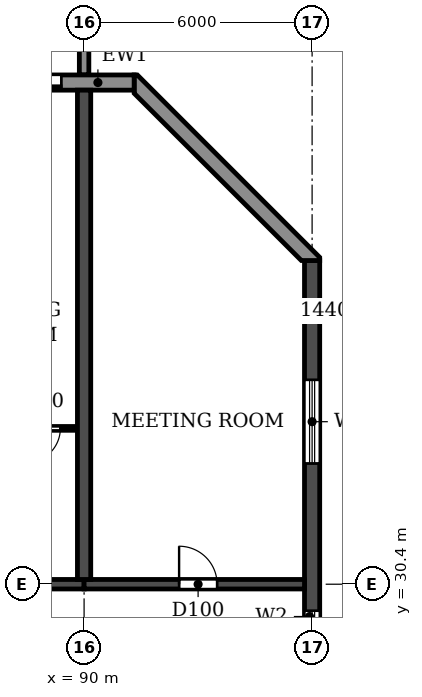
"""IFC4 building model, lengths in metres.
Left out: names, types, materials, properties, quantities, classifications, styles, units other than length and angle.
Written with IfcOpenShell. Run it as: python <this file> out.ifc"""

import sys

from ifc_helpers import new_model, si_unit, direction, frame, frame_2d, origin, place, context, subcontext, project, spatial, polyline, rectangle, outline, extrude, source, transform, mapped, element, fill, save


model = new_model("IFC4")
c1 = context("Model", 3, precision=1e-05, world=origin(), true_north=direction((0.0, 1.0)))
c2 = subcontext(c1, "Body", "Model", "MODEL_VIEW")
j1 = project(units=[si_unit("LENGTHUNIT", "METRE"), si_unit("PLANEANGLEUNIT", "RADIAN")], contexts=[c1])
p1 = place(None, origin())
s1 = spatial("IfcSite", under=j1, at=p1, CompositionType="ELEMENT")
p2 = place(p1, origin())
s2 = spatial("IfcBuilding", under=s1, at=p2, CompositionType="ELEMENT")
p3 = place(p2, frame((0.0, 0.0, 92.7)))
s3 = spatial("IfcBuildingStorey", under=s2, at=p3, CompositionType="ELEMENT", Elevation=92.7)
p4 = place(p3, frame((90.0, 30.525, 0.0), z_axis=(0.0, 0.0, 1.0), x_axis=(0.0, 1.0, 0.0)))
e1 = element("IfcWall", 1, at=p4, inside=s3, PredefinedType="SHEAR", context=c2, shape_type="SweptSolid", body=[
    extrude(rectangle(XDim=12.875, YDim=0.35, at=frame_2d((6.438, 0.0))), origin(), (0.0, 0.0, 1.0), 3.06),
])
p5 = place(p3, frame((96.0, 4.683, 0.0), z_axis=(0.0, 0.0, 1.0), x_axis=(0.0, 1.0, 0.0)))
e2 = element("IfcWall", 2, at=p5, inside=s3, PredefinedType="SHEAR", context=c2, shape_type="SweptSolid", body=[
    extrude(rectangle(XDim=34.234, YDim=0.4, at=frame_2d((17.117, 0.0))), origin(), (0.0, 0.0, 1.0), 3.06),
])
p6 = place(p5, frame((15.917, 0.0, 0.9)))
e3 = element("IfcOpeningElement", 3, at=p6, cuts=e2, PredefinedType="OPENING", context=c2, shape_type="SweptSolid", body=[
    extrude(rectangle(XDim=1.2, YDim=1.5, at=frame_2d((0.6, 0.75))), frame((0.0, 0.21, 0.0), z_axis=(0.0, -1.0, 0.0), x_axis=(1.0, 0.0, 0.0)), (0.0, 0.0, 1.0), 0.42),
])
p7 = place(p5, frame((23.817, 0.0, 0.9)))
e4 = element("IfcOpeningElement", 4, at=p7, cuts=e2, PredefinedType="OPENING", context=c2, shape_type="SweptSolid", body=[
    extrude(rectangle(XDim=1.2, YDim=1.5, at=frame_2d((0.6, 0.75))), frame((0.0, 0.21, 0.0), z_axis=(0.0, -1.0, 0.0), x_axis=(1.0, 0.0, 0.0)), (0.0, 0.0, 1.0), 0.42),
])
p8 = place(p5, frame((8.017, 0.0, 0.9)))
e5 = element("IfcOpeningElement", 5, at=p8, cuts=e2, PredefinedType="OPENING", context=c2, shape_type="SweptSolid", body=[
    extrude(rectangle(XDim=1.2, YDim=1.5, at=frame_2d((0.6, 0.75))), frame((0.0, 0.21, 0.0), z_axis=(0.0, -1.0, 0.0), x_axis=(1.0, 0.0, 0.0)), (0.0, 0.0, 1.0), 0.42),
])
p9 = place(p5, frame((28.894, 0.0, 0.6)))
e6 = element("IfcOpeningElement", 6, at=p9, cuts=e2, PredefinedType="OPENING", context=c2, shape_type="SweptSolid", body=[
    extrude(rectangle(XDim=2.2, YDim=1.8, at=frame_2d((1.1, 0.9))), frame((0.0, 0.21, 0.0), z_axis=(0.0, -1.0, 0.0), x_axis=(1.0, 0.0, 0.0)), (0.0, 0.0, 1.0), 0.42),
])
p10 = place(p5, frame((2.541, 0.0, 0.6)))
e7 = element("IfcOpeningElement", 7, at=p10, cuts=e2, PredefinedType="OPENING", context=c2, shape_type="SweptSolid", body=[
    extrude(rectangle(XDim=2.2, YDim=1.8, at=frame_2d((1.1, 0.9))), frame((0.0, 0.21, 0.0), z_axis=(0.0, -1.0, 0.0), x_axis=(1.0, 0.0, 0.0)), (0.0, 0.0, 1.0), 0.42),
])
p11 = place(p3, frame((84.0, 30.4, 0.0), z_axis=(0.0, 0.0, 1.0), x_axis=(1.0, 0.0, 0.0)))
e8 = element("IfcWall", 8, at=p11, inside=s3, PredefinedType="SHEAR", context=c2, shape_type="SweptSolid", body=[
    extrude(rectangle(XDim=6.0, YDim=0.25, at=frame_2d((3.0, 0.0))), origin(), (0.0, 0.0, 1.0), 2.46),
])
p12 = place(p11, frame((2.45, 0.0, 0.0)))
e9 = element("IfcOpeningElement", 9, at=p12, cuts=e8, PredefinedType="OPENING", context=c2, shape_type="SweptSolid", body=[
    extrude(rectangle(XDim=1.0, YDim=2.1, at=frame_2d((0.5, 1.05))), frame((0.0, 0.135, 0.0), z_axis=(0.0, -1.0, 0.0), x_axis=(1.0, 0.0, 0.0)), (0.0, 0.0, 1.0), 0.27),
])
p13 = place(p3, frame((90.0, 30.4, 0.0), z_axis=(0.0, 0.0, 1.0), x_axis=(1.0, 0.0, 0.0)))
e10 = element("IfcWall", 10, at=p13, inside=s3, PredefinedType="SHEAR", context=c2, shape_type="SweptSolid", body=[
    extrude(rectangle(XDim=5.8, YDim=0.25, at=frame_2d((2.9, 0.0))), origin(), (0.0, 0.0, 1.0), 2.46),
])
p14 = place(p13, frame((2.5, 0.0, 0.0)))
e11 = element("IfcOpeningElement", 11, at=p14, cuts=e10, PredefinedType="OPENING", context=c2, shape_type="SweptSolid", body=[
    extrude(rectangle(XDim=1.0, YDim=2.1, at=frame_2d((0.5, 1.05))), frame((0.0, 0.135, 0.0), z_axis=(0.0, -1.0, 0.0), x_axis=(1.0, 0.0, 0.0)), (0.0, 0.0, 1.0), 0.27),
])
p15 = place(p3, origin())
e12 = element("IfcWall", 12, at=p15, inside=s3, PredefinedType="STANDARD", context=c2, shape_type="SweptSolid", body=[
    extrude(outline(polyline([(96.2, 38.917), (96.2, 39.0), (91.4, 43.8), (91.317, 43.8), (91.317, 43.317), (95.717, 38.917), (96.2, 38.917)])), origin(), (0.0, 0.0, 1.0), 3.06),
])
p16 = place(p3, frame((91.317, 43.6, 0.0), z_axis=(0.0, 0.0, 1.0), x_axis=(-1.0, 0.0, 0.0)))
e13 = element("IfcWall", 13, at=p16, inside=s3, PredefinedType="STANDARD", context=c2, shape_type="SweptSolid", body=[
    extrude(rectangle(XDim=80.634, YDim=0.4, at=frame_2d((40.317, 0.0))), origin(), (0.0, 0.0, 1.0), 3.06),
])
p17 = place(p16, frame((76.717, 0.0, 0.9)))
e14 = element("IfcOpeningElement", 14, at=p17, cuts=e13, PredefinedType="OPENING", context=c2, shape_type="SweptSolid", body=[
    extrude(rectangle(XDim=2.2, YDim=1.5, at=frame_2d((1.1, 0.75))), frame((0.0, 0.21, 0.0), z_axis=(0.0, -1.0, 0.0), x_axis=(1.0, 0.0, 0.0)), (0.0, 0.0, 1.0), 0.42),
])
p18 = place(p16, frame((73.917, 0.0, 0.0)))
e15 = element("IfcOpeningElement", 15, at=p18, cuts=e13, PredefinedType="OPENING", context=c2, shape_type="SweptSolid", body=[
    extrude(rectangle(XDim=1.8, YDim=2.4, at=frame_2d((0.9, 1.2))), frame((0.0, 0.21, 0.0), z_axis=(0.0, -1.0, 0.0), x_axis=(1.0, 0.0, 0.0)), (0.0, 0.0, 1.0), 0.42),
])
p19 = place(p16, frame((70.717, 0.0, 0.9)))
e16 = element("IfcOpeningElement", 16, at=p19, cuts=e13, PredefinedType="OPENING", context=c2, shape_type="SweptSolid", body=[
    extrude(rectangle(XDim=2.2, YDim=1.5, at=frame_2d((1.1, 0.75))), frame((0.0, 0.21, 0.0), z_axis=(0.0, -1.0, 0.0), x_axis=(1.0, 0.0, 0.0)), (0.0, 0.0, 1.0), 0.42),
])
p20 = place(p16, frame((67.717, 0.0, 0.9)))
e17 = element("IfcOpeningElement", 17, at=p20, cuts=e13, PredefinedType="OPENING", context=c2, shape_type="SweptSolid", body=[
    extrude(rectangle(XDim=2.2, YDim=1.5, at=frame_2d((1.1, 0.75))), frame((0.0, 0.21, 0.0), z_axis=(0.0, -1.0, 0.0), x_axis=(1.0, 0.0, 0.0)), (0.0, 0.0, 1.0), 0.42),
])
p21 = place(p16, frame((64.717, 0.0, 0.9)))
e18 = element("IfcOpeningElement", 18, at=p21, cuts=e13, PredefinedType="OPENING", context=c2, shape_type="SweptSolid", body=[
    extrude(rectangle(XDim=2.2, YDim=1.5, at=frame_2d((1.1, 0.75))), frame((0.0, 0.21, 0.0), z_axis=(0.0, -1.0, 0.0), x_axis=(1.0, 0.0, 0.0)), (0.0, 0.0, 1.0), 0.42),
])
p22 = place(p16, frame((61.917, 0.0, 0.0)))
e19 = element("IfcOpeningElement", 19, at=p22, cuts=e13, PredefinedType="OPENING", context=c2, shape_type="SweptSolid", body=[
    extrude(rectangle(XDim=1.8, YDim=2.4, at=frame_2d((0.9, 1.2))), frame((0.0, 0.21, 0.0), z_axis=(0.0, -1.0, 0.0), x_axis=(1.0, 0.0, 0.0)), (0.0, 0.0, 1.0), 0.42),
])
p23 = place(p16, frame((58.717, 0.0, 0.9)))
e20 = element("IfcOpeningElement", 20, at=p23, cuts=e13, PredefinedType="OPENING", context=c2, shape_type="SweptSolid", body=[
    extrude(rectangle(XDim=2.2, YDim=1.5, at=frame_2d((1.1, 0.75))), frame((0.0, 0.21, 0.0), z_axis=(0.0, -1.0, 0.0), x_axis=(1.0, 0.0, 0.0)), (0.0, 0.0, 1.0), 0.42),
])
p24 = place(p16, frame((55.717, 0.0, 0.9)))
e21 = element("IfcOpeningElement", 21, at=p24, cuts=e13, PredefinedType="OPENING", context=c2, shape_type="SweptSolid", body=[
    extrude(rectangle(XDim=2.2, YDim=1.5, at=frame_2d((1.1, 0.75))), frame((0.0, 0.21, 0.0), z_axis=(0.0, -1.0, 0.0), x_axis=(1.0, 0.0, 0.0)), (0.0, 0.0, 1.0), 0.42),
])
p25 = place(p16, frame((52.917, 0.0, 0.0)))
e22 = element("IfcOpeningElement", 22, at=p25, cuts=e13, PredefinedType="OPENING", context=c2, shape_type="SweptSolid", body=[
    extrude(rectangle(XDim=1.8, YDim=2.4, at=frame_2d((0.9, 1.2))), frame((0.0, 0.21, 0.0), z_axis=(0.0, -1.0, 0.0), x_axis=(1.0, 0.0, 0.0)), (0.0, 0.0, 1.0), 0.42),
])
p26 = place(p16, frame((49.717, 0.0, 0.9)))
e23 = element("IfcOpeningElement", 23, at=p26, cuts=e13, PredefinedType="OPENING", context=c2, shape_type="SweptSolid", body=[
    extrude(rectangle(XDim=2.2, YDim=1.5, at=frame_2d((1.1, 0.75))), frame((0.0, 0.21, 0.0), z_axis=(0.0, -1.0, 0.0), x_axis=(1.0, 0.0, 0.0)), (0.0, 0.0, 1.0), 0.42),
])
p27 = place(p16, frame((46.717, 0.0, 0.9)))
e24 = element("IfcOpeningElement", 24, at=p27, cuts=e13, PredefinedType="OPENING", context=c2, shape_type="SweptSolid", body=[
    extrude(rectangle(XDim=2.2, YDim=1.5, at=frame_2d((1.1, 0.75))), frame((0.0, 0.21, 0.0), z_axis=(0.0, -1.0, 0.0), x_axis=(1.0, 0.0, 0.0)), (0.0, 0.0, 1.0), 0.42),
])
p28 = place(p16, frame((43.717, 0.0, 0.9)))
e25 = element("IfcOpeningElement", 25, at=p28, cuts=e13, PredefinedType="OPENING", context=c2, shape_type="SweptSolid", body=[
    extrude(rectangle(XDim=2.2, YDim=1.5, at=frame_2d((1.1, 0.75))), frame((0.0, 0.21, 0.0), z_axis=(0.0, -1.0, 0.0), x_axis=(1.0, 0.0, 0.0)), (0.0, 0.0, 1.0), 0.42),
])
p29 = place(p16, frame((40.717, 0.0, 0.9)))
e26 = element("IfcOpeningElement", 26, at=p29, cuts=e13, PredefinedType="OPENING", context=c2, shape_type="SweptSolid", body=[
    extrude(rectangle(XDim=2.2, YDim=1.5, at=frame_2d((1.1, 0.75))), frame((0.0, 0.21, 0.0), z_axis=(0.0, -1.0, 0.0), x_axis=(1.0, 0.0, 0.0)), (0.0, 0.0, 1.0), 0.42),
])
p30 = place(p16, frame((37.917, 0.0, 0.0)))
e27 = element("IfcOpeningElement", 27, at=p30, cuts=e13, PredefinedType="OPENING", context=c2, shape_type="SweptSolid", body=[
    extrude(rectangle(XDim=1.8, YDim=2.4, at=frame_2d((0.9, 1.2))), frame((0.0, 0.21, 0.0), z_axis=(0.0, -1.0, 0.0), x_axis=(1.0, 0.0, 0.0)), (0.0, 0.0, 1.0), 0.42),
])
p31 = place(p16, frame((34.917, 0.0, 0.0)))
e28 = element("IfcOpeningElement", 28, at=p31, cuts=e13, PredefinedType="OPENING", context=c2, shape_type="SweptSolid", body=[
    extrude(rectangle(XDim=1.8, YDim=2.4, at=frame_2d((0.9, 1.2))), frame((0.0, 0.21, 0.0), z_axis=(0.0, -1.0, 0.0), x_axis=(1.0, 0.0, 0.0)), (0.0, 0.0, 1.0), 0.42),
])
p32 = place(p16, frame((31.717, 0.0, 0.9)))
e29 = element("IfcOpeningElement", 29, at=p32, cuts=e13, PredefinedType="OPENING", context=c2, shape_type="SweptSolid", body=[
    extrude(rectangle(XDim=2.2, YDim=1.5, at=frame_2d((1.1, 0.75))), frame((0.0, 0.21, 0.0), z_axis=(0.0, -1.0, 0.0), x_axis=(1.0, 0.0, 0.0)), (0.0, 0.0, 1.0), 0.42),
])
p33 = place(p16, frame((28.717, 0.0, 0.9)))
e30 = element("IfcOpeningElement", 30, at=p33, cuts=e13, PredefinedType="OPENING", context=c2, shape_type="SweptSolid", body=[
    extrude(rectangle(XDim=2.2, YDim=1.5, at=frame_2d((1.1, 0.75))), frame((0.0, 0.21, 0.0), z_axis=(0.0, -1.0, 0.0), x_axis=(1.0, 0.0, 0.0)), (0.0, 0.0, 1.0), 0.42),
])
p34 = place(p16, frame((25.717, 0.0, 0.9)))
e31 = element("IfcOpeningElement", 31, at=p34, cuts=e13, PredefinedType="OPENING", context=c2, shape_type="SweptSolid", body=[
    extrude(rectangle(XDim=2.2, YDim=1.5, at=frame_2d((1.1, 0.75))), frame((0.0, 0.21, 0.0), z_axis=(0.0, -1.0, 0.0), x_axis=(1.0, 0.0, 0.0)), (0.0, 0.0, 1.0), 0.42),
])
p35 = place(p16, frame((22.717, 0.0, 0.9)))
e32 = element("IfcOpeningElement", 32, at=p35, cuts=e13, PredefinedType="OPENING", context=c2, shape_type="SweptSolid", body=[
    extrude(rectangle(XDim=2.2, YDim=1.5, at=frame_2d((1.1, 0.75))), frame((0.0, 0.21, 0.0), z_axis=(0.0, -1.0, 0.0), x_axis=(1.0, 0.0, 0.0)), (0.0, 0.0, 1.0), 0.42),
])
p36 = place(p16, frame((19.917, 0.0, 0.0)))
e33 = element("IfcOpeningElement", 33, at=p36, cuts=e13, PredefinedType="OPENING", context=c2, shape_type="SweptSolid", body=[
    extrude(rectangle(XDim=1.8, YDim=2.4, at=frame_2d((0.9, 1.2))), frame((0.0, 0.21, 0.0), z_axis=(0.0, -1.0, 0.0), x_axis=(1.0, 0.0, 0.0)), (0.0, 0.0, 1.0), 0.42),
])
p37 = place(p16, frame((16.717, 0.0, 0.9)))
e34 = element("IfcOpeningElement", 34, at=p37, cuts=e13, PredefinedType="OPENING", context=c2, shape_type="SweptSolid", body=[
    extrude(rectangle(XDim=2.2, YDim=1.5, at=frame_2d((1.1, 0.75))), frame((0.0, 0.21, 0.0), z_axis=(0.0, -1.0, 0.0), x_axis=(1.0, 0.0, 0.0)), (0.0, 0.0, 1.0), 0.42),
])
p38 = place(p16, frame((13.917, 0.0, 0.0)))
e35 = element("IfcOpeningElement", 35, at=p38, cuts=e13, PredefinedType="OPENING", context=c2, shape_type="SweptSolid", body=[
    extrude(rectangle(XDim=1.8, YDim=2.4, at=frame_2d((0.9, 1.2))), frame((0.0, 0.21, 0.0), z_axis=(0.0, -1.0, 0.0), x_axis=(1.0, 0.0, 0.0)), (0.0, 0.0, 1.0), 0.42),
])
p39 = place(p16, frame((10.717, 0.0, 0.9)))
e36 = element("IfcOpeningElement", 36, at=p39, cuts=e13, PredefinedType="OPENING", context=c2, shape_type="SweptSolid", body=[
    extrude(rectangle(XDim=2.2, YDim=1.5, at=frame_2d((1.1, 0.75))), frame((0.0, 0.21, 0.0), z_axis=(0.0, -1.0, 0.0), x_axis=(1.0, 0.0, 0.0)), (0.0, 0.0, 1.0), 0.42),
])
p40 = place(p16, frame((7.917, 0.0, 0.0)))
e37 = element("IfcOpeningElement", 37, at=p40, cuts=e13, PredefinedType="OPENING", context=c2, shape_type="SweptSolid", body=[
    extrude(rectangle(XDim=1.8, YDim=2.4, at=frame_2d((0.9, 1.2))), frame((0.0, 0.21, 0.0), z_axis=(0.0, -1.0, 0.0), x_axis=(1.0, 0.0, 0.0)), (0.0, 0.0, 1.0), 0.42),
])
p41 = place(p16, frame((4.717, 0.0, 0.9)))
e38 = element("IfcOpeningElement", 38, at=p41, cuts=e13, PredefinedType="OPENING", context=c2, shape_type="SweptSolid", body=[
    extrude(rectangle(XDim=2.2, YDim=1.5, at=frame_2d((1.1, 0.75))), frame((0.0, 0.21, 0.0), z_axis=(0.0, -1.0, 0.0), x_axis=(1.0, 0.0, 0.0)), (0.0, 0.0, 1.0), 0.42),
])
p42 = place(p16, frame((1.917, 0.0, 0.0)))
e39 = element("IfcOpeningElement", 39, at=p42, cuts=e13, PredefinedType="OPENING", context=c2, shape_type="SweptSolid", body=[
    extrude(rectangle(XDim=1.8, YDim=2.4, at=frame_2d((0.9, 1.2))), frame((0.0, 0.21, 0.0), z_axis=(0.0, -1.0, 0.0), x_axis=(1.0, 0.0, 0.0)), (0.0, 0.0, 1.0), 0.42),
])
m1 = source(origin(), c2, "Body", "SweptSolid", [
    extrude(outline(polyline([(0.0, 0.0), (0.25, 0.0), (0.25, 3.1), (0.0, 3.1), (0.0, 0.0)])), origin(), (0.0, 0.0, 1.0), 3.1),
])
p43 = place(p3, frame((89.875, 43.8, 0.0)))
e40 = element("IfcWall", 40, at=p43, inside=s3, PredefinedType="STANDARD", context=c2, shape_type="MappedRepresentation", body=[
    mapped(m1, transform((0.0, 0.0, 0.0))),
])
p44 = place(p3, frame((87.8, 34.5, 0.0), z_axis=(0.0, 0.0, 1.0), x_axis=(1.0, 0.0, 0.0)))
e41 = element("IfcWall", 41, at=p44, inside=s3, PredefinedType="PARTITIONING", context=c2, shape_type="SweptSolid", body=[
    extrude(rectangle(XDim=2.015, YDim=0.1, at=frame_2d((1.007, 0.0))), origin(), (0.0, 0.0, 1.0), 3.06),
])
p45 = place(p44, frame((0.675, 0.0, 0.0)))
e42 = element("IfcOpeningElement", 42, at=p45, cuts=e41, PredefinedType="OPENING", context=c2, shape_type="SweptSolid", body=[
    extrude(rectangle(XDim=0.9, YDim=2.1, at=frame_2d((0.45, 1.05))), frame((0.0, 0.06, 0.0), z_axis=(0.0, -1.0, 0.0), x_axis=(1.0, 0.0, 0.0)), (0.0, 0.0, 1.0), 0.12),
])
p46 = place(p7, origin())
e43 = element("IfcWindow", 43, at=p46, inside=s3, PartitioningType="SINGLE_PANEL", PredefinedType="WINDOW", context=c2, shape_type="SweptSolid", body=[
    extrude(rectangle(XDim=1.2, YDim=1.5, at=frame_2d((0.6, 0.75))), frame((0.0, 0.03, 0.0), z_axis=(0.0, -1.0, 0.0), x_axis=(1.0, 0.0, 0.0)), (0.0, 0.0, 1.0), 0.06),
])
fill(e4, e43)
p47 = place(p9, origin())
e44 = element("IfcWindow", 44, at=p47, inside=s3, PartitioningType="DOUBLE_PANEL_HORIZONTAL", PredefinedType="WINDOW", context=c2, shape_type="SweptSolid", body=[
    extrude(rectangle(XDim=2.2, YDim=1.8, at=frame_2d((1.1, 0.9))), frame((0.0, 0.03, 0.0), z_axis=(0.0, -1.0, 0.0), x_axis=(1.0, 0.0, 0.0)), (0.0, 0.0, 1.0), 0.06),
])
fill(e6, e44)
p48 = place(p42, origin())
e45 = element("IfcDoor", 45, at=p48, inside=s3, OperationType="DOUBLE_DOOR_SLIDING", PredefinedType="DOOR", context=c2, shape_type="SweptSolid", body=[
    extrude(rectangle(XDim=1.8, YDim=2.4, at=frame_2d((0.9, 1.2))), frame((0.0, 0.025, 0.0), z_axis=(0.0, -1.0, 0.0), x_axis=(1.0, 0.0, 0.0)), (0.0, 0.0, 1.0), 0.05),
])
fill(e39, e45)
p49 = place(p45, frame((0.9, 0.0, 0.0), z_axis=(0.0, 0.0, 1.0), x_axis=(-1.0, 0.0, 0.0)))
e46 = element("IfcDoor", 46, at=p49, inside=s3, OperationType="SINGLE_SWING_RIGHT", PredefinedType="DOOR", context=c2, shape_type="SweptSolid", body=[
    extrude(rectangle(XDim=0.9, YDim=2.1, at=frame_2d((0.45, 1.05))), frame((0.0, 0.025, 0.0), z_axis=(0.0, -1.0, 0.0), x_axis=(1.0, 0.0, 0.0)), (0.0, 0.0, 1.0), 0.05),
])
fill(e42, e46)
p50 = place(p14, origin())
e47 = element("IfcDoor", 47, at=p50, inside=s3, OperationType="SINGLE_SWING_LEFT", PredefinedType="DOOR", context=c2, shape_type="SweptSolid", body=[
    extrude(rectangle(XDim=1.0, YDim=2.1, at=frame_2d((0.5, 1.05))), frame((0.0, 0.025, 0.0), z_axis=(0.0, -1.0, 0.0), x_axis=(1.0, 0.0, 0.0)), (0.0, 0.0, 1.0), 0.05),
])
fill(e11, e47)
save(model, sys.argv[1])
